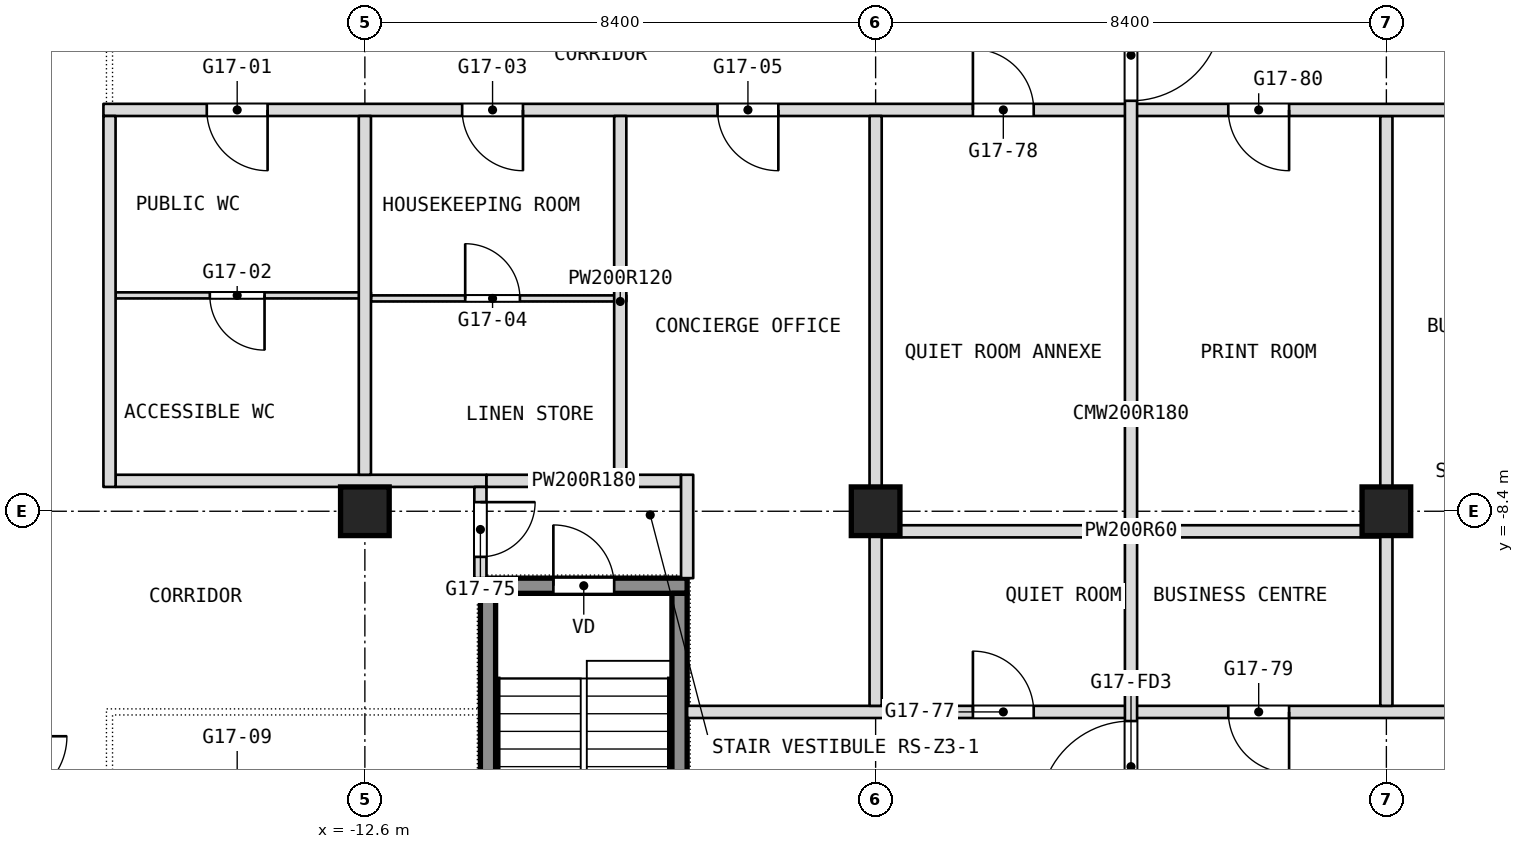
"""IFC4 building model, lengths in metres.
Left out: names, types, materials, properties, quantities, classifications, styles, units other than length and angle.
Written with IfcOpenShell. Run it as: python <this file> out.ifc"""

import sys

from ifc_helpers import new_model, si_unit, direction, frame, frame_2d, origin, origin_2d, place, context, subcontext, project, spatial, rectangle, extrude, element, fill, save


model = new_model("IFC4")
c1 = context("Model", 3, precision=1e-05, world=origin(), true_north=direction((0.0, 1.0)))
c2 = subcontext(c1, "Body", "Model", "MODEL_VIEW")
j1 = project(units=[si_unit("LENGTHUNIT", "METRE"), si_unit("PLANEANGLEUNIT", "RADIAN")], contexts=[c1])
p1 = place(None, origin())
s1 = spatial("IfcSite", under=j1, at=p1, CompositionType="ELEMENT")
p2 = place(p1, origin())
s2 = spatial("IfcBuilding", under=s1, at=p2, CompositionType="ELEMENT")
p3 = place(p2, frame((0.0, 0.0, 209.3)))
s3 = spatial("IfcBuildingStorey", under=s2, at=p3, CompositionType="ELEMENT", Elevation=209.3)
for number, where, z_axis, x_axis in (
    (1, (-12.6, -8.4, 0.0), (0.0, 0.0, 1.0), (1.0, 0.0, 0.0)),
    (2, (-4.2, -8.4, 0.0), (0.0, 0.0, 1.0), (1.0, 0.0, 0.0)),
    (3, (4.2, -8.4, 0.0), (0.0, 0.0, 1.0), (1.0, 0.0, 0.0)),
):
    element("IfcColumn", number, at=place(p3, frame(where, z_axis=z_axis, x_axis=x_axis)), inside=s3, PredefinedType="COLUMN", context=c2, shape_type="SweptSolid", body=[
        extrude(rectangle(XDim=0.8, YDim=0.8, at=origin_2d()), origin(), (0.0, 0.0, 1.0), 3.6),
    ])
p4 = place(p3, frame((-7.3, -11.7, 0.0), z_axis=(0.0, 0.0, 1.0), x_axis=(1.0, 0.0, 0.0)))
e4 = element("IfcWall", 4, at=p4, inside=s3, PredefinedType="PARTITIONING", context=c2, shape_type="SweptSolid", body=[
    extrude(rectangle(XDim=14.6, YDim=0.2, at=frame_2d((7.3, 0.0))), origin(), (0.0, 0.0, 1.0), 3.34),
])
p5 = place(p4, frame((4.7, 0.0, 0.0)))
e5 = element("IfcOpeningElement", 5, at=p5, cuts=e4, PredefinedType="OPENING", context=c2, shape_type="SweptSolid", body=[
    extrude(rectangle(XDim=1.0, YDim=2.1, at=frame_2d((0.5, 1.05))), frame((0.0, 0.1, 0.0), z_axis=(0.0, -1.0, 0.0), x_axis=(1.0, 0.0, 0.0)), (0.0, 0.0, 1.0), 0.2),
])
p6 = place(p4, frame((8.9, 0.0, 0.0)))
e6 = element("IfcOpeningElement", 6, at=p6, cuts=e4, PredefinedType="OPENING", context=c2, shape_type="SweptSolid", body=[
    extrude(rectangle(XDim=1.0, YDim=2.1, at=frame_2d((0.5, 1.05))), frame((0.0, 0.1, 0.0), z_axis=(0.0, -1.0, 0.0), x_axis=(1.0, 0.0, 0.0)), (0.0, 0.0, 1.0), 0.2),
])
p7 = place(p3, frame((-4.1, -8.73, 0.0), z_axis=(0.0, 0.0, 1.0), x_axis=(1.0, 0.0, 0.0)))
e7 = element("IfcWall", 7, at=p7, inside=s3, PredefinedType="PARTITIONING", context=c2, shape_type="SweptSolid", body=[
    extrude(rectangle(XDim=8.2, YDim=0.2, at=frame_2d((4.1, 0.0))), origin(), (0.0, 0.0, 1.0), 3.34),
])
p8 = place(p3, frame((-16.7, -7.9, 0.0), z_axis=(0.0, 0.0, 1.0), x_axis=(1.0, 0.0, 0.0)))
e8 = element("IfcWall", 8, at=p8, inside=s3, PredefinedType="PARTITIONING", context=c2, shape_type="SweptSolid", body=[
    extrude(rectangle(XDim=6.1, YDim=0.2, at=frame_2d((3.05, 0.0))), origin(), (0.0, 0.0, 1.0), 3.34),
])
p9 = place(p3, frame((-10.6, -7.9, 0.0), z_axis=(0.0, 0.0, 1.0), x_axis=(1.0, 0.0, 0.0)))
e9 = element("IfcWall", 9, at=p9, inside=s3, PredefinedType="PARTITIONING", context=c2, shape_type="SweptSolid", body=[
    extrude(rectangle(XDim=3.2, YDim=0.2, at=frame_2d((1.6, 0.0))), origin(), (0.0, 0.0, 1.0), 3.34),
])
p10 = place(p3, frame((-12.5, -4.9, 0.0), z_axis=(0.0, 0.0, 1.0), x_axis=(1.0, 0.0, 0.0)))
e10 = element("IfcWall", 10, at=p10, inside=s3, PredefinedType="PARTITIONING", context=c2, shape_type="SweptSolid", body=[
    extrude(rectangle(XDim=4.2, YDim=0.1, at=frame_2d((2.1, 0.0))), origin(), (0.0, 0.0, 1.0), 3.34),
])
p11 = place(p10, frame((1.55, 0.0, 0.0)))
e11 = element("IfcOpeningElement", 11, at=p11, cuts=e10, PredefinedType="OPENING", context=c2, shape_type="SweptSolid", body=[
    extrude(rectangle(XDim=0.9, YDim=2.1, at=frame_2d((0.45, 1.05))), frame((0.0, 0.05, 0.0), z_axis=(0.0, -1.0, 0.0), x_axis=(1.0, 0.0, 0.0)), (0.0, 0.0, 1.0), 0.1),
])
p12 = place(p3, frame((-16.7, -4.85, 0.0), z_axis=(0.0, 0.0, 1.0), x_axis=(1.0, 0.0, 0.0)))
e12 = element("IfcWall", 12, at=p12, inside=s3, PredefinedType="PARTITIONING", context=c2, shape_type="SweptSolid", body=[
    extrude(rectangle(XDim=4.2, YDim=0.1, at=frame_2d((2.1, 0.0))), origin(), (0.0, 0.0, 1.0), 3.34),
])
p13 = place(p12, frame((1.55, 0.0, 0.0)))
e13 = element("IfcOpeningElement", 13, at=p13, cuts=e12, PredefinedType="OPENING", context=c2, shape_type="SweptSolid", body=[
    extrude(rectangle(XDim=0.9, YDim=2.1, at=frame_2d((0.45, 1.05))), frame((0.0, 0.05, 0.0), z_axis=(0.0, -1.0, 0.0), x_axis=(1.0, 0.0, 0.0)), (0.0, 0.0, 1.0), 0.1),
])
p14 = place(p3, frame((4.2, -11.6, 0.0), z_axis=(0.0, 0.0, 1.0), x_axis=(0.0, 1.0, 0.0)))
e14 = element("IfcWall", 14, at=p14, inside=s3, PredefinedType="PARTITIONING", context=c2, shape_type="SweptSolid", body=[
    extrude(rectangle(XDim=9.7, YDim=0.2, at=frame_2d((4.85, 0.0))), origin(), (0.0, 0.0, 1.0), 3.34),
])
p15 = place(p3, frame((-16.9, -1.8, 0.0), z_axis=(0.0, 0.0, 1.0), x_axis=(1.0, 0.0, 0.0)))
e15 = element("IfcWall", 15, at=p15, inside=s3, PredefinedType="PARTITIONING", context=c2, shape_type="SweptSolid", body=[
    extrude(rectangle(XDim=33.8, YDim=0.2, at=frame_2d((16.9, 0.0))), origin(), (0.0, 0.0, 1.0), 3.34),
])
p16 = place(p15, frame((1.7, 0.0, 0.0)))
e16 = element("IfcOpeningElement", 16, at=p16, cuts=e15, PredefinedType="OPENING", context=c2, shape_type="SweptSolid", body=[
    extrude(rectangle(XDim=1.0, YDim=2.1, at=frame_2d((0.5, 1.05))), frame((0.0, 0.1, 0.0), z_axis=(0.0, -1.0, 0.0), x_axis=(1.0, 0.0, 0.0)), (0.0, 0.0, 1.0), 0.2),
])
p17 = place(p15, frame((5.9, 0.0, 0.0)))
e17 = element("IfcOpeningElement", 17, at=p17, cuts=e15, PredefinedType="OPENING", context=c2, shape_type="SweptSolid", body=[
    extrude(rectangle(XDim=1.0, YDim=2.1, at=frame_2d((0.5, 1.05))), frame((0.0, 0.1, 0.0), z_axis=(0.0, -1.0, 0.0), x_axis=(1.0, 0.0, 0.0)), (0.0, 0.0, 1.0), 0.2),
])
p18 = place(p15, frame((10.1, 0.0, 0.0)))
e18 = element("IfcOpeningElement", 18, at=p18, cuts=e15, PredefinedType="OPENING", context=c2, shape_type="SweptSolid", body=[
    extrude(rectangle(XDim=1.0, YDim=2.1, at=frame_2d((0.5, 1.05))), frame((0.0, 0.1, 0.0), z_axis=(0.0, -1.0, 0.0), x_axis=(1.0, 0.0, 0.0)), (0.0, 0.0, 1.0), 0.2),
])
p19 = place(p15, frame((22.7, 0.0, 0.0)))
e19 = element("IfcOpeningElement", 19, at=p19, cuts=e15, PredefinedType="OPENING", context=c2, shape_type="SweptSolid", body=[
    extrude(rectangle(XDim=1.0, YDim=2.1, at=frame_2d((0.5, 1.05))), frame((0.0, 0.1, 0.0), z_axis=(0.0, -1.0, 0.0), x_axis=(1.0, 0.0, 0.0)), (0.0, 0.0, 1.0), 0.2),
])
p20 = place(p15, frame((26.9, 0.0, 0.0)))
e20 = element("IfcOpeningElement", 20, at=p20, cuts=e15, PredefinedType="OPENING", context=c2, shape_type="SweptSolid", body=[
    extrude(rectangle(XDim=1.0, YDim=2.1, at=frame_2d((0.5, 1.05))), frame((0.0, 0.1, 0.0), z_axis=(0.0, -1.0, 0.0), x_axis=(1.0, 0.0, 0.0)), (0.0, 0.0, 1.0), 0.2),
])
p21 = place(p15, frame((31.1, 0.0, 0.0)))
e21 = element("IfcOpeningElement", 21, at=p21, cuts=e15, PredefinedType="OPENING", context=c2, shape_type="SweptSolid", body=[
    extrude(rectangle(XDim=1.0, YDim=2.1, at=frame_2d((0.5, 1.05))), frame((0.0, 0.1, 0.0), z_axis=(0.0, -1.0, 0.0), x_axis=(1.0, 0.0, 0.0)), (0.0, 0.0, 1.0), 0.2),
])
p22 = place(p15, frame((14.3, 0.0, 0.0)))
e22 = element("IfcOpeningElement", 22, at=p22, cuts=e15, PredefinedType="OPENING", context=c2, shape_type="SweptSolid", body=[
    extrude(rectangle(XDim=1.0, YDim=2.1, at=frame_2d((0.5, 1.05))), frame((0.0, 0.1, 0.0), z_axis=(0.0, -1.0, 0.0), x_axis=(1.0, 0.0, 0.0)), (0.0, 0.0, 1.0), 0.2),
])
p23 = place(p15, frame((18.5, 0.0, 0.0)))
e23 = element("IfcOpeningElement", 23, at=p23, cuts=e15, PredefinedType="OPENING", context=c2, shape_type="SweptSolid", body=[
    extrude(rectangle(XDim=1.0, YDim=2.1, at=frame_2d((0.5, 1.05))), frame((0.0, 0.1, 0.0), z_axis=(0.0, -1.0, 0.0), x_axis=(1.0, 0.0, 0.0)), (0.0, 0.0, 1.0), 0.2),
])
p24 = place(p3, frame((0.0, -13.6, 0.0), z_axis=(0.0, 0.0, 1.0), x_axis=(0.0, 1.0, 0.0)))
e24 = element("IfcWall", 24, at=p24, inside=s3, PredefinedType="PARTITIONING", context=c2, shape_type="SweptSolid", body=[
    extrude(rectangle(XDim=13.6, YDim=0.2, at=frame_2d((6.8, 0.0))), origin(), (0.0, 0.0, 1.0), 3.34),
])
p25 = place(p24, frame((11.95, 0.0, 0.0)))
e25 = element("IfcOpeningElement", 25, at=p25, cuts=e24, PredefinedType="OPENING", context=c2, shape_type="SweptSolid", body=[
    extrude(rectangle(XDim=1.5, YDim=2.1, at=frame_2d((0.75, 1.05))), frame((0.0, 0.1, 0.0), z_axis=(0.0, -1.0, 0.0), x_axis=(1.0, 0.0, 0.0)), (0.0, 0.0, 1.0), 0.2),
])
p26 = place(p24, frame((0.25, 0.0, 0.0)))
e26 = element("IfcOpeningElement", 26, at=p26, cuts=e24, PredefinedType="OPENING", context=c2, shape_type="SweptSolid", body=[
    extrude(rectangle(XDim=1.5, YDim=2.1, at=frame_2d((0.75, 1.05))), frame((0.0, 0.1, 0.0), z_axis=(0.0, -1.0, 0.0), x_axis=(1.0, 0.0, 0.0)), (0.0, 0.0, 1.0), 0.2),
])
p27 = place(p3, frame((-4.2, -11.6, 0.0), z_axis=(0.0, 0.0, 1.0), x_axis=(0.0, 1.0, 0.0)))
e27 = element("IfcWall", 27, at=p27, inside=s3, PredefinedType="PARTITIONING", context=c2, shape_type="SweptSolid", body=[
    extrude(rectangle(XDim=9.7, YDim=0.2, at=frame_2d((4.85, 0.0))), origin(), (0.0, 0.0, 1.0), 3.34),
])
p28 = place(p3, frame((-7.3, -9.5, 0.0), z_axis=(0.0, 0.0, 1.0), x_axis=(0.0, 1.0, 0.0)))
e28 = element("IfcWall", 28, at=p28, inside=s3, PredefinedType="PARTITIONING", context=c2, shape_type="SweptSolid", body=[
    extrude(rectangle(XDim=1.7, YDim=0.2, at=frame_2d((0.85, 0.0))), origin(), (0.0, 0.0, 1.0), 3.34),
])
p29 = place(p3, frame((-8.4, -8.0, 0.0), z_axis=(0.0, 0.0, 1.0), x_axis=(0.0, 1.0, 0.0)))
e29 = element("IfcWall", 29, at=p29, inside=s3, PredefinedType="PARTITIONING", context=c2, shape_type="SweptSolid", body=[
    extrude(rectangle(XDim=6.1, YDim=0.2, at=frame_2d((3.05, 0.0))), origin(), (0.0, 0.0, 1.0), 3.34),
])
p30 = place(p3, frame((-10.7, -9.5, 0.0), z_axis=(0.0, 0.0, 1.0), x_axis=(0.0, 1.0, 0.0)))
e30 = element("IfcWall", 30, at=p30, inside=s3, PredefinedType="PARTITIONING", context=c2, shape_type="SweptSolid", body=[
    extrude(rectangle(XDim=1.5, YDim=0.2, at=frame_2d((0.75, 0.0))), origin(), (0.0, 0.0, 1.0), 3.34),
])
p31 = place(p30, frame((0.35, 0.0, 0.0)))
e31 = element("IfcOpeningElement", 31, at=p31, cuts=e30, PredefinedType="OPENING", context=c2, shape_type="SweptSolid", body=[
    extrude(rectangle(XDim=0.9, YDim=2.1, at=frame_2d((0.45, 1.05))), frame((0.0, 0.1, 0.0), z_axis=(0.0, -1.0, 0.0), x_axis=(1.0, 0.0, 0.0)), (0.0, 0.0, 1.0), 0.2),
])
p32 = place(p3, frame((-12.6, -7.8, 0.0), z_axis=(0.0, 0.0, 1.0), x_axis=(0.0, 1.0, 0.0)))
e32 = element("IfcWall", 32, at=p32, inside=s3, PredefinedType="PARTITIONING", context=c2, shape_type="SweptSolid", body=[
    extrude(rectangle(XDim=5.9, YDim=0.2, at=frame_2d((2.95, 0.0))), origin(), (0.0, 0.0, 1.0), 3.34),
])
p33 = place(p3, frame((-16.8, -8.0, 0.0), z_axis=(0.0, 0.0, 1.0), x_axis=(0.0, 1.0, 0.0)))
e33 = element("IfcWall", 33, at=p33, inside=s3, PredefinedType="PARTITIONING", context=c2, shape_type="SweptSolid", body=[
    extrude(rectangle(XDim=6.1, YDim=0.2, at=frame_2d((3.05, 0.0))), origin(), (0.0, 0.0, 1.0), 3.34),
])
p34 = place(p3, frame((-10.7, -9.625, 0.1), z_axis=(0.0, 0.0, 1.0), x_axis=(1.0, 0.0, 0.0)))
e34 = element("IfcWall", 34, at=p34, inside=s3, PredefinedType="SHEAR", context=c2, shape_type="SweptSolid", body=[
    extrude(rectangle(XDim=3.4, YDim=0.25, at=frame_2d((1.7, 0.0))), origin(), (0.0, 0.0, 1.0), 3.6),
])
p35 = place(p34, frame((1.2, 0.0, 0.0)))
e35 = element("IfcOpeningElement", 35, at=p35, cuts=e34, PredefinedType="OPENING", context=c2, shape_type="SweptSolid", body=[
    extrude(rectangle(XDim=1.0, YDim=2.1, at=frame_2d((0.5, 1.05))), frame((0.0, 0.125, 0.0), z_axis=(0.0, -1.0, 0.0), x_axis=(1.0, 0.0, 0.0)), (0.0, 0.0, 1.0), 0.25),
])
for number, where, z_axis, x_axis in (
    (36, (-10.575, -15.45, 0.1), (0.0, 0.0, 1.0), (0.0, 1.0, 0.0)),
    (37, (-7.425, -15.45, 0.1), (0.0, 0.0, 1.0), (0.0, 1.0, 0.0)),
):
    element("IfcWall", number, at=place(p3, frame(where, z_axis=z_axis, x_axis=x_axis)), inside=s3, PredefinedType="SHEAR", context=c2, shape_type="SweptSolid", body=[
        extrude(rectangle(XDim=5.7, YDim=0.25, at=frame_2d((2.85, 0.0))), origin(), (0.0, 0.0, 1.0), 3.6),
    ])
p36 = place(p5, origin())
e38 = element("IfcDoor", 38, at=p36, inside=s3, OperationType="SINGLE_SWING_LEFT", PredefinedType="DOOR", context=c2, shape_type="SweptSolid", body=[
    extrude(rectangle(XDim=1.0, YDim=2.1, at=frame_2d((0.5, 1.05))), frame((0.0, 0.025, 0.0), z_axis=(0.0, -1.0, 0.0), x_axis=(1.0, 0.0, 0.0)), (0.0, 0.0, 1.0), 0.05),
])
fill(e5, e38)
p37 = place(p6, origin())
e39 = element("IfcDoor", 39, at=p37, inside=s3, OperationType="SINGLE_SWING_LEFT", PredefinedType="DOOR", context=c2, shape_type="SweptSolid", body=[
    extrude(rectangle(XDim=1.0, YDim=2.1, at=frame_2d((0.5, 1.05))), frame((0.0, 0.025, 0.0), z_axis=(0.0, -1.0, 0.0), x_axis=(1.0, 0.0, 0.0)), (0.0, 0.0, 1.0), 0.05),
])
fill(e6, e39)
p38 = place(p11, origin())
e40 = element("IfcDoor", 40, at=p38, inside=s3, OperationType="SINGLE_SWING_RIGHT", PredefinedType="DOOR", context=c2, shape_type="SweptSolid", body=[
    extrude(rectangle(XDim=0.9, YDim=2.1, at=frame_2d((0.45, 1.05))), frame((0.0, 0.025, 0.0), z_axis=(0.0, -1.0, 0.0), x_axis=(1.0, 0.0, 0.0)), (0.0, 0.0, 1.0), 0.05),
])
fill(e11, e40)
p39 = place(p13, origin())
e41 = element("IfcDoor", 41, at=p39, inside=s3, OperationType="SINGLE_SWING_RIGHT", PredefinedType="DOOR", context=c2, shape_type="SweptSolid", body=[
    extrude(rectangle(XDim=0.9, YDim=2.1, at=frame_2d((0.45, 1.05))), frame((0.0, 0.025, 0.0), z_axis=(0.0, -1.0, 0.0), x_axis=(1.0, 0.0, 0.0)), (0.0, 0.0, 1.0), 0.05),
])
fill(e13, e41)
p40 = place(p16, origin())
e42 = element("IfcDoor", 42, at=p40, inside=s3, OperationType="SINGLE_SWING_LEFT", PredefinedType="DOOR", context=c2, shape_type="SweptSolid", body=[
    extrude(rectangle(XDim=1.0, YDim=2.1, at=frame_2d((0.5, 1.05))), frame((0.0, 0.025, 0.0), z_axis=(0.0, -1.0, 0.0), x_axis=(1.0, 0.0, 0.0)), (0.0, 0.0, 1.0), 0.05),
])
fill(e16, e42)
p41 = place(p17, origin())
e43 = element("IfcDoor", 43, at=p41, inside=s3, OperationType="SINGLE_SWING_LEFT", PredefinedType="DOOR", context=c2, shape_type="SweptSolid", body=[
    extrude(rectangle(XDim=1.0, YDim=2.1, at=frame_2d((0.5, 1.05))), frame((0.0, 0.025, 0.0), z_axis=(0.0, -1.0, 0.0), x_axis=(1.0, 0.0, 0.0)), (0.0, 0.0, 1.0), 0.05),
])
fill(e17, e43)
p42 = place(p18, origin())
e44 = element("IfcDoor", 44, at=p42, inside=s3, OperationType="SINGLE_SWING_RIGHT", PredefinedType="DOOR", context=c2, shape_type="SweptSolid", body=[
    extrude(rectangle(XDim=1.0, YDim=2.1, at=frame_2d((0.5, 1.05))), frame((0.0, 0.025, 0.0), z_axis=(0.0, -1.0, 0.0), x_axis=(1.0, 0.0, 0.0)), (0.0, 0.0, 1.0), 0.05),
])
fill(e18, e44)
p43 = place(p22, origin())
e45 = element("IfcDoor", 45, at=p43, inside=s3, OperationType="SINGLE_SWING_LEFT", PredefinedType="DOOR", context=c2, shape_type="SweptSolid", body=[
    extrude(rectangle(XDim=1.0, YDim=2.1, at=frame_2d((0.5, 1.05))), frame((0.0, 0.025, 0.0), z_axis=(0.0, -1.0, 0.0), x_axis=(1.0, 0.0, 0.0)), (0.0, 0.0, 1.0), 0.05),
])
fill(e22, e45)
p44 = place(p23, origin())
e46 = element("IfcDoor", 46, at=p44, inside=s3, OperationType="SINGLE_SWING_LEFT", PredefinedType="DOOR", context=c2, shape_type="SweptSolid", body=[
    extrude(rectangle(XDim=1.0, YDim=2.1, at=frame_2d((0.5, 1.05))), frame((0.0, 0.025, 0.0), z_axis=(0.0, -1.0, 0.0), x_axis=(1.0, 0.0, 0.0)), (0.0, 0.0, 1.0), 0.05),
])
fill(e23, e46)
p45 = place(p31, origin())
e47 = element("IfcDoor", 47, at=p45, inside=s3, OperationType="SINGLE_SWING_LEFT", PredefinedType="DOOR", context=c2, shape_type="SweptSolid", body=[
    extrude(rectangle(XDim=0.9, YDim=2.1, at=frame_2d((0.45, 1.05))), frame((0.0, 0.025, 0.0), z_axis=(0.0, -1.0, 0.0), x_axis=(1.0, 0.0, 0.0)), (0.0, 0.0, 1.0), 0.05),
])
fill(e31, e47)
p46 = place(p35, origin())
e48 = element("IfcDoor", 48, at=p46, inside=s3, OperationType="SINGLE_SWING_LEFT", PredefinedType="DOOR", context=c2, shape_type="SweptSolid", body=[
    extrude(rectangle(XDim=1.0, YDim=2.1, at=frame_2d((0.5, 1.05))), frame((0.0, 0.025, 0.0), z_axis=(0.0, -1.0, 0.0), x_axis=(1.0, 0.0, 0.0)), (0.0, 0.0, 1.0), 0.05),
])
fill(e35, e48)
p47 = place(p25, origin())
e49 = element("IfcDoor", 49, at=p47, inside=s3, OperationType="DOUBLE_DOOR_DOUBLE_SWING", PredefinedType="DOOR", context=c2, shape_type="SweptSolid", body=[
    extrude(rectangle(XDim=1.5, YDim=2.1, at=frame_2d((0.75, 1.05))), frame((0.0, 0.025, 0.0), z_axis=(0.0, -1.0, 0.0), x_axis=(1.0, 0.0, 0.0)), (0.0, 0.0, 1.0), 0.05),
])
fill(e25, e49)
p48 = place(p26, origin())
e50 = element("IfcDoor", 50, at=p48, inside=s3, OperationType="DOUBLE_DOOR_DOUBLE_SWING", PredefinedType="DOOR", context=c2, shape_type="SweptSolid", body=[
    extrude(rectangle(XDim=1.5, YDim=2.1, at=frame_2d((0.75, 1.05))), frame((0.0, 0.025, 0.0), z_axis=(0.0, -1.0, 0.0), x_axis=(1.0, 0.0, 0.0)), (0.0, 0.0, 1.0), 0.05),
])
fill(e26, e50)
save(model, sys.argv[1])
